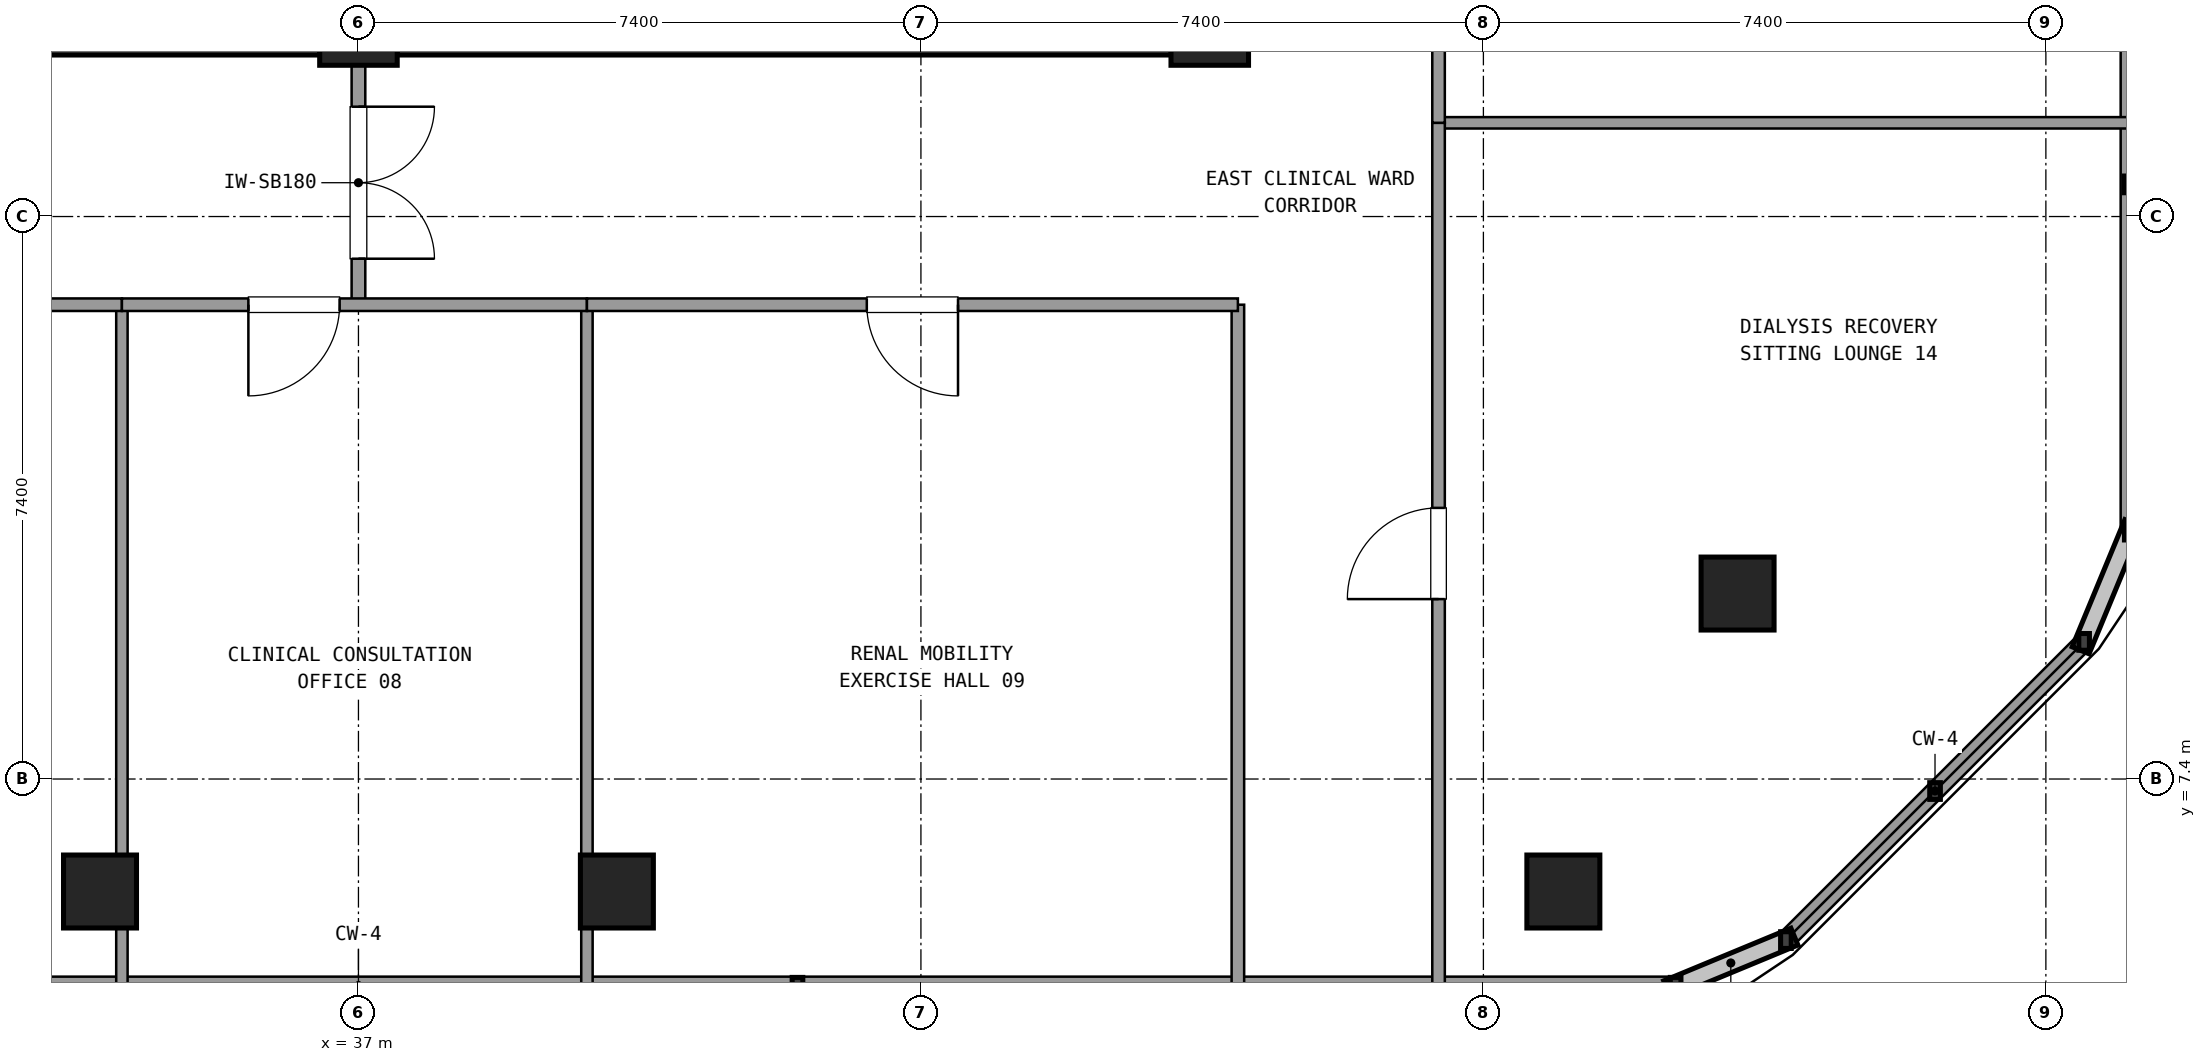
"""IFC4 building model, lengths in metres.
Left out: names, types, materials, properties, quantities, classifications, styles, units other than length and angle.
Written with IfcOpenShell. Run it as: python <this file> out.ifc"""

import sys

from ifc_helpers import new_model, si_unit, direction, frame, frame_2d, origin, origin_2d, place, context, subcontext, project, spatial, rectangle, extrude, element, fill, save


model = new_model("IFC4")
c1 = context("Model", 3, precision=1e-05, world=origin(), true_north=direction((0.0, 1.0)))
c2 = subcontext(c1, "Body", "Model", "MODEL_VIEW")
j1 = project(units=[si_unit("LENGTHUNIT", "METRE"), si_unit("PLANEANGLEUNIT", "RADIAN")], contexts=[c1])
p1 = place(None, origin())
s1 = spatial("IfcSite", under=j1, at=p1, CompositionType="ELEMENT")
p2 = place(p1, origin())
s2 = spatial("IfcBuilding", under=s1, at=p2, CompositionType="ELEMENT")
p3 = place(p2, frame((0.0, 0.0, 156.42)))
s3 = spatial("IfcBuildingStorey", under=s2, at=p3, CompositionType="ELEMENT", Elevation=156.42)
for number, where, z_axis, x_axis in (
    (1, (37.0, 17.3, 0.0), (0.0, 0.0, 1.0), (1.0, 0.0, 0.0)),
    (2, (48.2, 17.3, 0.0), (0.0, 0.0, 1.0), (1.0, 0.0, 0.0)),
):
    element("IfcColumn", number, at=place(p3, frame(where, z_axis=z_axis, x_axis=x_axis)), inside=s3, PredefinedType="COLUMN", context=c2, shape_type="SweptSolid", body=[
        extrude(rectangle(XDim=1.02, YDim=1.02, at=origin_2d()), origin(), (0.0, 0.0, 1.0), 3.6),
    ])
for number, where, z_axis, x_axis in (
    (3, (26.305, 17.3, 0.0), (0.0, 0.0, 1.0), (1.0, 0.0, 0.0)),
    (4, (37.505, 17.3, 0.0), (0.0, 0.0, 1.0), (1.0, 0.0, 0.0)),
):
    element("IfcWall", number, at=place(p3, frame(where, z_axis=z_axis, x_axis=x_axis)), inside=s3, PredefinedType="SHEAR", context=c2, shape_type="SweptSolid", body=[
        extrude(rectangle(XDim=10.19, YDim=0.75, at=frame_2d((5.095, 0.0))), origin(), (0.0, 0.0, 1.0), 3.32),
    ])
for number, where, z_axis, x_axis in (
    (5, (33.6, 5.92, 0.0), (0.0, 0.0, 1.0), (1.0, 0.0, 0.0)),
    (6, (40.4, 5.92, 0.0), (0.0, 0.0, 1.0), (1.0, 0.0, 0.0)),
    (7, (52.852, 5.92, 0.0), (0.0, 0.0, 1.0), (1.0, 0.0, 0.0)),
    (8, (55.144, 9.84, 0.0), (0.0, 0.0, 1.0), (1.0, 0.0, 0.0)),
):
    element("IfcColumn", number, at=place(p3, frame(where, z_axis=z_axis, x_axis=x_axis)), inside=s3, PredefinedType="COLUMN", context=c2, shape_type="SweptSolid", body=[
        extrude(rectangle(XDim=0.96, YDim=0.96, at=origin_2d()), origin(), (0.0, 0.0, 1.0), 3.6),
    ])
p4 = place(p3, frame((19.671, 4.68, 0.0), z_axis=(0.0, 0.0, 1.0), x_axis=(1.0, 0.0, 0.0)))
e9 = element("IfcWall", 9, at=p4, inside=s3, PredefinedType="SOLIDWALL", context=c2, shape_type="SweptSolid", body=[
    extrude(rectangle(XDim=34.658, YDim=0.24, at=frame_2d((17.329, 0.0))), origin(), (0.0, 0.0, 1.0), 0.85),
])
p5 = place(p3, frame((55.78, 5.281, 0.0), z_axis=(0.0, 0.0, 1.0), x_axis=(0.707084777957, 0.707128783731, 0.0)))
e10 = element("IfcWall", 10, at=p5, inside=s3, PredefinedType="SOLIDWALL", context=c2, shape_type="SweptSolid", body=[
    extrude(rectangle(XDim=5.548, YDim=0.24, at=frame_2d((2.774, 0.0))), origin(), (0.0, 0.0, 1.0), 0.85),
])
p6 = place(p3, frame((60.304, 10.655, 0.0), z_axis=(0.0, 0.0, 1.0), x_axis=(0.0, 1.0, 0.0)))
e11 = element("IfcWall", 11, at=p6, inside=s3, PredefinedType="SOLIDWALL", context=c2, shape_type="SweptSolid", body=[
    extrude(rectangle(XDim=13.705, YDim=0.24, at=frame_2d((6.853, 0.0))), origin(), (0.0, 0.0, 1.0), 0.85),
])
p7 = place(p3, frame((37.0, 13.64, 0.0), z_axis=(0.0, 0.0, 1.0), x_axis=(0.0, 1.0, 0.0)))
e12 = element("IfcWall", 12, at=p7, inside=s3, PredefinedType="PARTITIONING", context=c2, shape_type="SweptSolid", body=[
    extrude(rectangle(XDim=3.21, YDim=0.18, at=frame_2d((1.605, 0.0))), origin(), (0.0, 0.0, 1.0), 2.61),
])
p8 = place(p7, frame((0.605, 0.0, 0.0)))
e13 = element("IfcOpeningElement", 13, at=p8, cuts=e12, PredefinedType="OPENING", context=c2, shape_type="SweptSolid", body=[
    extrude(rectangle(XDim=2.0, YDim=2.2, at=frame_2d((1.0, 1.1))), frame((0.0, 0.1, 0.0), z_axis=(0.0, -1.0, 0.0), x_axis=(1.0, 0.0, 0.0)), (0.0, 0.0, 1.0), 0.2),
])
p9 = place(p3, frame((48.57, 4.7, 0.0), z_axis=(0.0, 0.0, 1.0), x_axis=(0.0, 1.0, 0.0)))
e14 = element("IfcWall", 14, at=p9, inside=s3, PredefinedType="PARTITIONING", context=c2, shape_type="SweptSolid", body=[
    extrude(rectangle(XDim=8.94, YDim=0.165, at=frame_2d((4.47, 0.0))), origin(), (0.0, 0.0, 1.0), 2.61),
])
p10 = place(p3, frame((33.888, 13.64, 0.0), z_axis=(0.0, 0.0, 1.0), x_axis=(0.0, -1.0, 0.0)))
e15 = element("IfcWall", 15, at=p10, inside=s3, PredefinedType="PARTITIONING", context=c2, shape_type="SweptSolid", body=[
    extrude(rectangle(XDim=8.94, YDim=0.15, at=frame_2d((4.47, 0.0))), origin(), (0.0, 0.0, 1.0), 2.61),
])
p11 = place(p3, frame((25.43, 13.64, 0.0), z_axis=(0.0, 0.0, 1.0), x_axis=(1.0, 0.0, 0.0)))
e16 = element("IfcWall", 16, at=p11, inside=s3, PredefinedType="PARTITIONING", context=c2, shape_type="SweptSolid", body=[
    extrude(rectangle(XDim=8.458, YDim=0.165, at=frame_2d((4.229, 0.0))), origin(), (0.0, 0.0, 1.0), 2.61),
])
p12 = place(p11, frame((3.629, 0.0, 0.0)))
e17 = element("IfcOpeningElement", 17, at=p12, cuts=e16, PredefinedType="OPENING", context=c2, shape_type="SweptSolid", body=[
    extrude(rectangle(XDim=1.2, YDim=2.15, at=frame_2d((0.6, 1.075))), frame((0.0, 0.093, 0.0), z_axis=(0.0, -1.0, 0.0), x_axis=(1.0, 0.0, 0.0)), (0.0, 0.0, 1.0), 0.185),
])
p13 = place(p3, frame((40.006, 13.64, 0.0), z_axis=(0.0, 0.0, 1.0), x_axis=(0.0, -1.0, 0.0)))
e18 = element("IfcWall", 18, at=p13, inside=s3, PredefinedType="PARTITIONING", context=c2, shape_type="SweptSolid", body=[
    extrude(rectangle(XDim=8.94, YDim=0.15, at=frame_2d((4.47, 0.0))), origin(), (0.0, 0.0, 1.0), 2.61),
])
p14 = place(p3, frame((33.888, 13.64, 0.0), z_axis=(0.0, 0.0, 1.0), x_axis=(1.0, 0.0, 0.0)))
e19 = element("IfcWall", 19, at=p14, inside=s3, PredefinedType="PARTITIONING", context=c2, shape_type="SweptSolid", body=[
    extrude(rectangle(XDim=6.118, YDim=0.165, at=frame_2d((3.059, 0.0))), origin(), (0.0, 0.0, 1.0), 2.61),
])
p15 = place(p14, frame((1.664, 0.0, 0.0)))
e20 = element("IfcOpeningElement", 20, at=p15, cuts=e19, PredefinedType="OPENING", context=c2, shape_type="SweptSolid", body=[
    extrude(rectangle(XDim=1.2, YDim=2.15, at=frame_2d((0.6, 1.075))), frame((0.0, 0.093, 0.0), z_axis=(0.0, -1.0, 0.0), x_axis=(1.0, 0.0, 0.0)), (0.0, 0.0, 1.0), 0.185),
])
p16 = place(p3, frame((40.006, 13.64, 0.0), z_axis=(0.0, 0.0, 1.0), x_axis=(1.0, 0.0, 0.0)))
e21 = element("IfcWall", 21, at=p16, inside=s3, PredefinedType="PARTITIONING", context=c2, shape_type="SweptSolid", body=[
    extrude(rectangle(XDim=8.564, YDim=0.165, at=frame_2d((4.282, 0.0))), origin(), (0.0, 0.0, 1.0), 2.61),
])
p17 = place(p16, frame((3.682, 0.0, 0.0)))
e22 = element("IfcOpeningElement", 22, at=p17, cuts=e21, PredefinedType="OPENING", context=c2, shape_type="SweptSolid", body=[
    extrude(rectangle(XDim=1.2, YDim=2.15, at=frame_2d((0.6, 1.075))), frame((0.0, 0.093, 0.0), z_axis=(0.0, -1.0, 0.0), x_axis=(1.0, 0.0, 0.0)), (0.0, 0.0, 1.0), 0.185),
])
p18 = place(p3, frame((51.21, 16.033, 0.0), z_axis=(0.0, 0.0, 1.0), x_axis=(1.0, 0.0, 0.0)))
e23 = element("IfcWall", 23, at=p18, inside=s3, PredefinedType="PARTITIONING", context=c2, shape_type="SweptSolid", body=[
    extrude(rectangle(XDim=9.074, YDim=0.15, at=frame_2d((4.537, 0.0))), origin(), (0.0, 0.0, 1.0), 2.61),
])
p19 = place(p3, frame((51.21, 4.7, 0.0), z_axis=(0.0, 0.0, 1.0), x_axis=(0.0, 1.0, 0.0)))
e24 = element("IfcWall", 24, at=p19, inside=s3, PredefinedType="PARTITIONING", context=c2, shape_type="SweptSolid", body=[
    extrude(rectangle(XDim=11.333, YDim=0.165, at=frame_2d((5.667, 0.0))), origin(), (0.0, 0.0, 1.0), 2.61),
])
p20 = place(p19, frame((5.067, 0.0, 0.0)))
e25 = element("IfcOpeningElement", 25, at=p20, cuts=e24, PredefinedType="OPENING", context=c2, shape_type="SweptSolid", body=[
    extrude(rectangle(XDim=1.2, YDim=2.15, at=frame_2d((0.6, 1.075))), frame((0.0, 0.093, 0.0), z_axis=(0.0, -1.0, 0.0), x_axis=(1.0, 0.0, 0.0)), (0.0, 0.0, 1.0), 0.185),
])
p21 = place(p3, frame((51.21, 16.033, 0.0), z_axis=(0.0, 0.0, 1.0), x_axis=(0.0, 1.0, 0.0)))
e26 = element("IfcWall", 26, at=p21, inside=s3, PredefinedType="PARTITIONING", context=c2, shape_type="SweptSolid", body=[
    extrude(rectangle(XDim=8.207, YDim=0.165, at=frame_2d((4.104, 0.0))), origin(), (0.0, 0.0, 1.0), 2.61),
])
p22 = place(p21, frame((3.503, 0.0, 0.0)))
e27 = element("IfcOpeningElement", 27, at=p22, cuts=e26, PredefinedType="OPENING", context=c2, shape_type="SweptSolid", body=[
    extrude(rectangle(XDim=1.2, YDim=2.15, at=frame_2d((0.6, 1.075))), frame((0.0, 0.093, 0.0), z_axis=(0.0, -1.0, 0.0), x_axis=(1.0, 0.0, 0.0)), (0.0, 0.0, 1.0), 0.185),
])
p23 = place(p8, frame((2.0, 0.0, 0.0), z_axis=(0.0, 0.0, 1.0), x_axis=(-1.0, 0.0, 0.0)))
e28 = element("IfcDoor", 28, at=p23, inside=s3, OperationType="DOUBLE_DOOR_SINGLE_SWING", PredefinedType="DOOR", context=c2, shape_type="SweptSolid", body=[
    extrude(rectangle(XDim=2.0, YDim=2.2, at=frame_2d((1.0, 1.1))), frame((0.0, 0.025, 0.0), z_axis=(0.0, -1.0, 0.0), x_axis=(1.0, 0.0, 0.0)), (0.0, 0.0, 1.0), 0.05),
])
fill(e13, e28)
p24 = place(p15, frame((1.2, 0.0, 0.0), z_axis=(0.0, 0.0, 1.0), x_axis=(-1.0, 0.0, 0.0)))
e29 = element("IfcDoor", 29, at=p24, inside=s3, OperationType="SINGLE_SWING_LEFT", PredefinedType="DOOR", context=c2, shape_type="SweptSolid", body=[
    extrude(rectangle(XDim=1.2, YDim=2.15, at=frame_2d((0.6, 1.075))), frame((0.0, 0.025, 0.0), z_axis=(0.0, -1.0, 0.0), x_axis=(1.0, 0.0, 0.0)), (0.0, 0.0, 1.0), 0.05),
])
fill(e20, e29)
p25 = place(p17, frame((1.2, 0.0, 0.0), z_axis=(0.0, 0.0, 1.0), x_axis=(-1.0, 0.0, 0.0)))
e30 = element("IfcDoor", 30, at=p25, inside=s3, OperationType="SINGLE_SWING_RIGHT", PredefinedType="DOOR", context=c2, shape_type="SweptSolid", body=[
    extrude(rectangle(XDim=1.2, YDim=2.15, at=frame_2d((0.6, 1.075))), frame((0.0, 0.025, 0.0), z_axis=(0.0, -1.0, 0.0), x_axis=(1.0, 0.0, 0.0)), (0.0, 0.0, 1.0), 0.05),
])
fill(e22, e30)
p26 = place(p20, origin())
e31 = element("IfcDoor", 31, at=p26, inside=s3, OperationType="SINGLE_SWING_LEFT", PredefinedType="DOOR", context=c2, shape_type="SweptSolid", body=[
    extrude(rectangle(XDim=1.2, YDim=2.15, at=frame_2d((0.6, 1.075))), frame((0.0, 0.025, 0.0), z_axis=(0.0, -1.0, 0.0), x_axis=(1.0, 0.0, 0.0)), (0.0, 0.0, 1.0), 0.05),
])
fill(e25, e31)
save(model, sys.argv[1])
